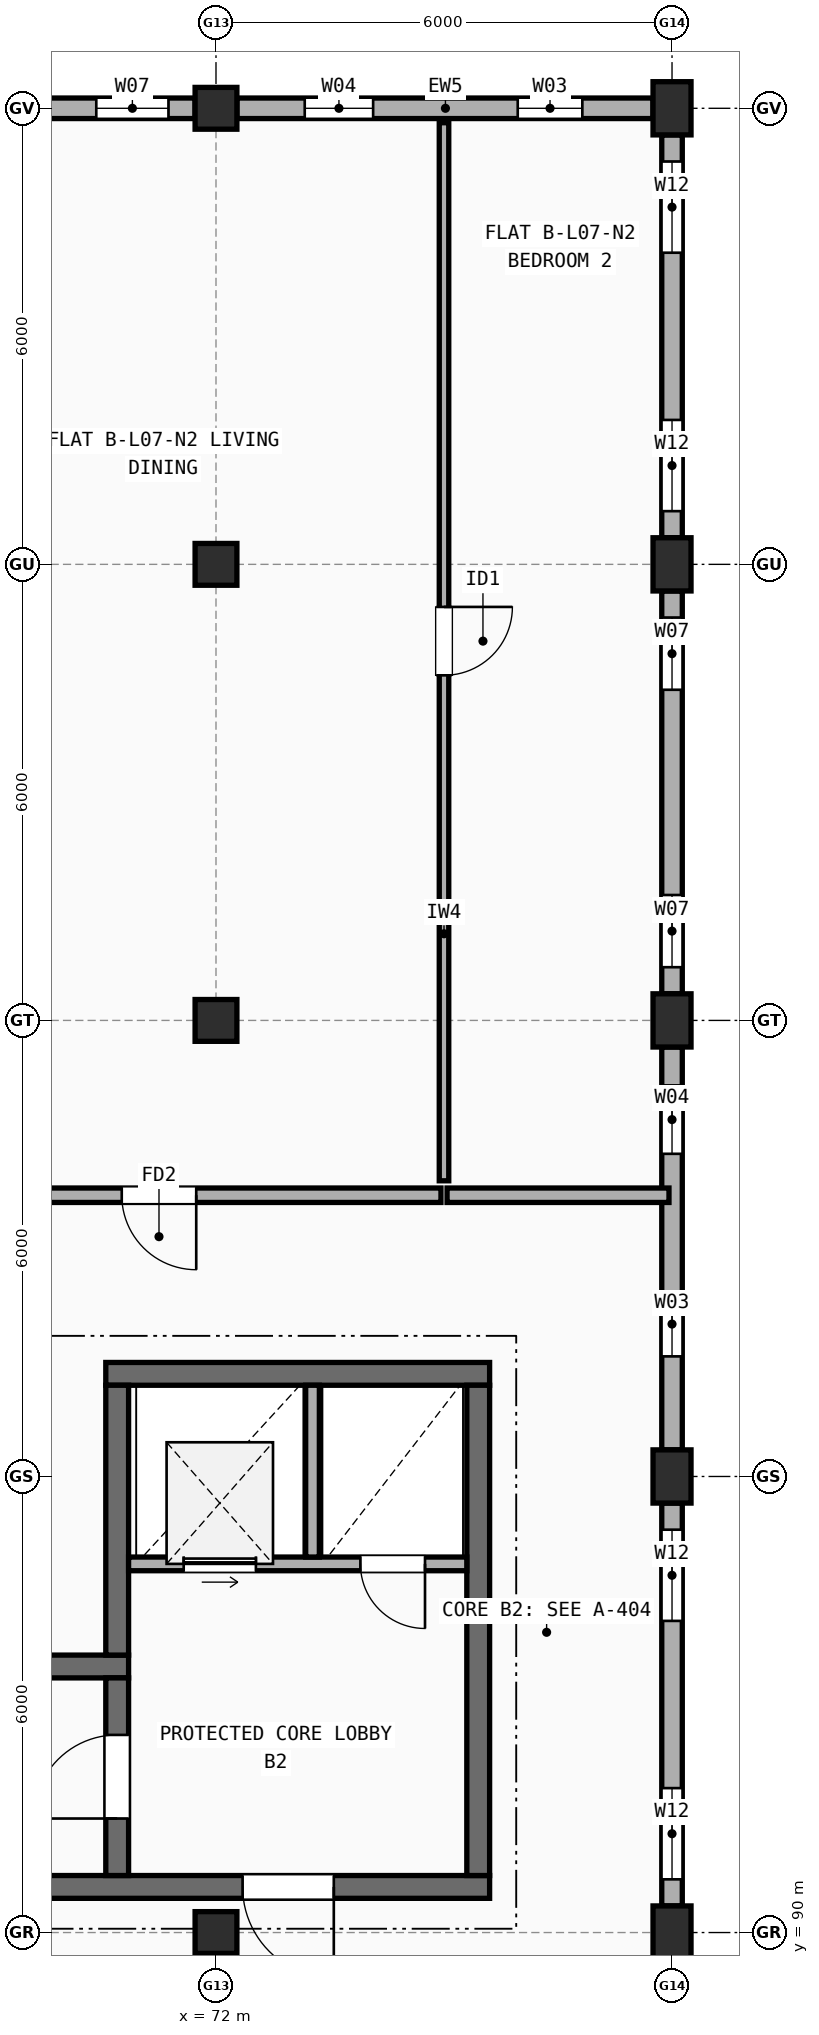
"""IFC4 building model, lengths in metres.
Left out: names, types, materials, properties, quantities, classifications, styles, units other than length and angle.
Written with IfcOpenShell. Run it as: python <this file> out.ifc"""

import sys

from ifc_helpers import new_model, si_unit, direction, frame, frame_2d, origin, origin_2d, place, context, subcontext, project, spatial, rectangle, extrude, element, fill, save


model = new_model("IFC4")
c1 = context("Model", 3, precision=1e-05, world=origin(), true_north=direction((0.0, 1.0)))
c2 = subcontext(c1, "Body", "Model", "MODEL_VIEW")
j1 = project(units=[si_unit("LENGTHUNIT", "METRE"), si_unit("PLANEANGLEUNIT", "RADIAN")], contexts=[c1])
p1 = place(None, origin())
s1 = spatial("IfcSite", under=j1, at=p1, CompositionType="ELEMENT")
p2 = place(p1, origin())
s2 = spatial("IfcBuilding", under=s1, at=p2, CompositionType="ELEMENT")
p3 = place(p2, frame((0.0, 0.0, 23.7)))
s3 = spatial("IfcBuildingStorey", under=s2, at=p3, CompositionType="ELEMENT", Elevation=23.7)
for number, where, z_axis, x_axis in (
    (1, (72.0, 90.0, 0.0), (0.0, 0.0, 1.0), (1.0, 0.0, 0.0)),
    (2, (72.0, 102.0, 0.0), (0.0, 0.0, 1.0), (1.0, 0.0, 0.0)),
    (3, (72.0, 108.0, 0.0), (0.0, 0.0, 1.0), (1.0, 0.0, 0.0)),
    (4, (72.0, 114.0, 0.0), (0.0, 0.0, 1.0), (1.0, 0.0, 0.0)),
):
    element("IfcColumn", number, at=place(p3, frame(where, z_axis=z_axis, x_axis=x_axis)), inside=s3, PredefinedType="COLUMN", context=c2, shape_type="SweptSolid", body=[
        extrude(rectangle(XDim=0.55, YDim=0.55, at=origin_2d()), origin(), (0.0, 0.0, 1.0), 2.975),
    ])
for number, where, z_axis, x_axis in (
    (5, (78.0, 90.0, 0.0), (0.0, 0.0, 1.0), (1.0, 0.0, 0.0)),
    (6, (78.0, 96.0, 0.0), (0.0, 0.0, 1.0), (1.0, 0.0, 0.0)),
    (7, (78.0, 102.0, 0.0), (0.0, 0.0, 1.0), (1.0, 0.0, 0.0)),
    (8, (78.0, 108.0, 0.0), (0.0, 0.0, 1.0), (1.0, 0.0, 0.0)),
    (9, (78.0, 114.0, 0.0), (0.0, 0.0, 1.0), (1.0, 0.0, 0.0)),
):
    element("IfcColumn", number, at=place(p3, frame(where, z_axis=z_axis, x_axis=x_axis)), inside=s3, PredefinedType="COLUMN", context=c2, shape_type="SweptSolid", body=[
        extrude(rectangle(XDim=0.5, YDim=0.7, at=origin_2d()), origin(), (0.0, 0.0, 1.0), 2.975),
    ])
p4 = place(p3, frame((78.0, 90.35, 0.0), z_axis=(0.0, 0.0, 1.0), x_axis=(0.0, 1.0, 0.0)))
e10 = element("IfcWall", 10, at=p4, inside=s3, PredefinedType="STANDARD", context=c2, shape_type="SweptSolid", body=[
    extrude(rectangle(XDim=5.3, YDim=0.27, at=frame_2d((2.65, 0.0))), origin(), (0.0, 0.0, 1.0), 2.457),
])
p5 = place(p4, frame((0.35, 0.0, 0.9)))
e11 = element("IfcOpeningElement", 11, at=p5, cuts=e10, PredefinedType="OPENING", context=c2, shape_type="SweptSolid", body=[
    extrude(rectangle(XDim=1.2, YDim=1.35, at=frame_2d((0.6, 0.675))), frame((0.0, 0.145, 0.0), z_axis=(0.0, -1.0, 0.0), x_axis=(1.0, 0.0, 0.0)), (0.0, 0.0, 1.0), 0.29),
])
p6 = place(p4, frame((3.75, 0.0, 0.9)))
e12 = element("IfcOpeningElement", 12, at=p6, cuts=e10, PredefinedType="OPENING", context=c2, shape_type="SweptSolid", body=[
    extrude(rectangle(XDim=1.2, YDim=1.35, at=frame_2d((0.6, 0.675))), frame((0.0, 0.145, 0.0), z_axis=(0.0, -1.0, 0.0), x_axis=(1.0, 0.0, 0.0)), (0.0, 0.0, 1.0), 0.29),
])
p7 = place(p3, frame((78.0, 96.35, 0.0), z_axis=(0.0, 0.0, 1.0), x_axis=(0.0, 1.0, 0.0)))
e13 = element("IfcWall", 13, at=p7, inside=s3, PredefinedType="STANDARD", context=c2, shape_type="SweptSolid", body=[
    extrude(rectangle(XDim=5.3, YDim=0.27, at=frame_2d((2.65, 0.0))), origin(), (0.0, 0.0, 1.0), 2.457),
])
p8 = place(p7, frame((1.23, 0.0, 0.9)))
e14 = element("IfcOpeningElement", 14, at=p8, cuts=e13, PredefinedType="OPENING", context=c2, shape_type="SweptSolid", body=[
    extrude(rectangle(XDim=0.85, YDim=1.25, at=frame_2d((0.425, 0.625))), frame((0.0, 0.145, 0.0), z_axis=(0.0, -1.0, 0.0), x_axis=(1.0, 0.0, 0.0)), (0.0, 0.0, 1.0), 0.29),
])
p9 = place(p7, frame((3.895, 0.0, 0.9)))
e15 = element("IfcOpeningElement", 15, at=p9, cuts=e13, PredefinedType="OPENING", context=c2, shape_type="SweptSolid", body=[
    extrude(rectangle(XDim=0.9, YDim=1.3, at=frame_2d((0.45, 0.65))), frame((0.0, 0.145, 0.0), z_axis=(0.0, -1.0, 0.0), x_axis=(1.0, 0.0, 0.0)), (0.0, 0.0, 1.0), 0.29),
])
p10 = place(p3, frame((78.0, 102.35, 0.0), z_axis=(0.0, 0.0, 1.0), x_axis=(0.0, 1.0, 0.0)))
e16 = element("IfcWall", 16, at=p10, inside=s3, PredefinedType="STANDARD", context=c2, shape_type="SweptSolid", body=[
    extrude(rectangle(XDim=5.3, YDim=0.27, at=frame_2d((2.65, 0.0))), origin(), (0.0, 0.0, 1.0), 2.457),
])
p11 = place(p10, frame((0.35, 0.0, 0.9)))
e17 = element("IfcOpeningElement", 17, at=p11, cuts=e16, PredefinedType="OPENING", context=c2, shape_type="SweptSolid", body=[
    extrude(rectangle(XDim=0.95, YDim=1.35, at=frame_2d((0.475, 0.675))), frame((0.0, 0.145, 0.0), z_axis=(0.0, -1.0, 0.0), x_axis=(1.0, 0.0, 0.0)), (0.0, 0.0, 1.0), 0.29),
])
p12 = place(p10, frame((4.0, 0.0, 0.9)))
e18 = element("IfcOpeningElement", 18, at=p12, cuts=e16, PredefinedType="OPENING", context=c2, shape_type="SweptSolid", body=[
    extrude(rectangle(XDim=0.95, YDim=1.35, at=frame_2d((0.475, 0.675))), frame((0.0, 0.145, 0.0), z_axis=(0.0, -1.0, 0.0), x_axis=(1.0, 0.0, 0.0)), (0.0, 0.0, 1.0), 0.29),
])
p13 = place(p3, frame((78.0, 108.35, 0.0), z_axis=(0.0, 0.0, 1.0), x_axis=(0.0, 1.0, 0.0)))
e19 = element("IfcWall", 19, at=p13, inside=s3, PredefinedType="STANDARD", context=c2, shape_type="SweptSolid", body=[
    extrude(rectangle(XDim=5.3, YDim=0.27, at=frame_2d((2.65, 0.0))), origin(), (0.0, 0.0, 1.0), 2.457),
])
p14 = place(p13, frame((0.35, 0.0, 0.9)))
e20 = element("IfcOpeningElement", 20, at=p14, cuts=e19, PredefinedType="OPENING", context=c2, shape_type="SweptSolid", body=[
    extrude(rectangle(XDim=1.2, YDim=1.35, at=frame_2d((0.6, 0.675))), frame((0.0, 0.145, 0.0), z_axis=(0.0, -1.0, 0.0), x_axis=(1.0, 0.0, 0.0)), (0.0, 0.0, 1.0), 0.29),
])
p15 = place(p13, frame((3.75, 0.0, 0.9)))
e21 = element("IfcOpeningElement", 21, at=p15, cuts=e19, PredefinedType="OPENING", context=c2, shape_type="SweptSolid", body=[
    extrude(rectangle(XDim=1.2, YDim=1.35, at=frame_2d((0.6, 0.675))), frame((0.0, 0.145, 0.0), z_axis=(0.0, -1.0, 0.0), x_axis=(1.0, 0.0, 0.0)), (0.0, 0.0, 1.0), 0.29),
])
p16 = place(p3, frame((77.75, 114.0, 0.0), z_axis=(0.0, 0.0, 1.0), x_axis=(-1.0, 0.0, 0.0)))
e22 = element("IfcWall", 22, at=p16, inside=s3, PredefinedType="STANDARD", context=c2, shape_type="SweptSolid", body=[
    extrude(rectangle(XDim=5.475, YDim=0.27, at=frame_2d((2.738, 0.0))), origin(), (0.0, 0.0, 1.0), 2.457),
])
p17 = place(p16, frame((0.93, 0.0, 0.9)))
e23 = element("IfcOpeningElement", 23, at=p17, cuts=e22, PredefinedType="OPENING", context=c2, shape_type="SweptSolid", body=[
    extrude(rectangle(XDim=0.85, YDim=1.25, at=frame_2d((0.425, 0.625))), frame((0.0, 0.145, 0.0), z_axis=(0.0, -1.0, 0.0), x_axis=(1.0, 0.0, 0.0)), (0.0, 0.0, 1.0), 0.29),
])
p18 = place(p16, frame((3.683, 0.0, 0.9)))
e24 = element("IfcOpeningElement", 24, at=p18, cuts=e22, PredefinedType="OPENING", context=c2, shape_type="SweptSolid", body=[
    extrude(rectangle(XDim=0.9, YDim=1.3, at=frame_2d((0.45, 0.65))), frame((0.0, 0.145, 0.0), z_axis=(0.0, -1.0, 0.0), x_axis=(1.0, 0.0, 0.0)), (0.0, 0.0, 1.0), 0.29),
])
p19 = place(p3, frame((71.725, 114.0, 0.0), z_axis=(0.0, 0.0, 1.0), x_axis=(-1.0, 0.0, 0.0)))
e25 = element("IfcWall", 25, at=p19, inside=s3, PredefinedType="STANDARD", context=c2, shape_type="SweptSolid", body=[
    extrude(rectangle(XDim=5.45, YDim=0.27, at=frame_2d((2.725, 0.0))), origin(), (0.0, 0.0, 1.0), 2.457),
])
p20 = place(p19, frame((0.35, 0.0, 0.9)))
e26 = element("IfcOpeningElement", 26, at=p20, cuts=e25, PredefinedType="OPENING", context=c2, shape_type="SweptSolid", body=[
    extrude(rectangle(XDim=0.95, YDim=1.35, at=frame_2d((0.475, 0.675))), frame((0.0, 0.145, 0.0), z_axis=(0.0, -1.0, 0.0), x_axis=(1.0, 0.0, 0.0)), (0.0, 0.0, 1.0), 0.29),
])
p21 = place(p19, frame((2.885, 0.0, 0.9)))
e27 = element("IfcOpeningElement", 27, at=p21, cuts=e25, PredefinedType="OPENING", context=c2, shape_type="SweptSolid", body=[
    extrude(rectangle(XDim=0.95, YDim=1.35, at=frame_2d((0.475, 0.675))), frame((0.0, 0.145, 0.0), z_axis=(0.0, -1.0, 0.0), x_axis=(1.0, 0.0, 0.0)), (0.0, 0.0, 1.0), 0.29),
])
p22 = place(p3, frame((64.25, 90.6, 0.0), z_axis=(0.0, 0.0, 1.0), x_axis=(1.0, 0.0, 0.0)))
e28 = element("IfcWall", 28, at=p22, inside=s3, PredefinedType="SHEAR", context=c2, shape_type="SweptSolid", body=[
    extrude(rectangle(XDim=11.35, YDim=0.3, at=frame_2d((5.675, 0.0))), origin(), (0.0, 0.0, 1.0), 2.975),
])
p23 = place(p22, frame((8.1, 0.0, 0.0)))
e29 = element("IfcOpeningElement", 29, at=p23, cuts=e28, PredefinedType="OPENING", context=c2, shape_type="SweptSolid", body=[
    extrude(rectangle(XDim=1.2, YDim=2.15, at=frame_2d((0.6, 1.075))), frame((0.0, 0.16, 0.0), z_axis=(0.0, -1.0, 0.0), x_axis=(1.0, 0.0, 0.0)), (0.0, 0.0, 1.0), 0.32),
])
p24 = place(p3, frame((70.85, 93.5, 0.0), z_axis=(0.0, 0.0, 1.0), x_axis=(-1.0, 0.0, 0.0)))
e30 = element("IfcWall", 30, at=p24, inside=s3, PredefinedType="SHEAR", context=c2, shape_type="SweptSolid", body=[
    extrude(rectangle(XDim=6.6, YDim=0.3, at=frame_2d((3.3, 0.0))), origin(), (0.0, 0.0, 1.0), 2.975),
])
p25 = place(p3, frame((70.7, 90.75, 0.0), z_axis=(0.0, 0.0, 1.0), x_axis=(0.0, 1.0, 0.0)))
e31 = element("IfcWall", 31, at=p25, inside=s3, PredefinedType="SHEAR", context=c2, shape_type="SweptSolid", body=[
    extrude(rectangle(XDim=2.6, YDim=0.3, at=frame_2d((1.3, 0.0))), origin(), (0.0, 0.0, 1.0), 2.975),
])
p26 = place(p25, frame((0.75, 0.0, 0.0)))
e32 = element("IfcOpeningElement", 32, at=p26, cuts=e31, PredefinedType="OPENING", context=c2, shape_type="SweptSolid", body=[
    extrude(rectangle(XDim=1.1, YDim=2.15, at=frame_2d((0.55, 1.075))), frame((0.0, 0.16, 0.0), z_axis=(0.0, -1.0, 0.0), x_axis=(1.0, 0.0, 0.0)), (0.0, 0.0, 1.0), 0.32),
])
p27 = place(p3, frame((75.6, 97.35, 0.0), z_axis=(0.0, 0.0, 1.0), x_axis=(-1.0, 0.0, 0.0)))
e33 = element("IfcWall", 33, at=p27, inside=s3, PredefinedType="SHEAR", context=c2, shape_type="SweptSolid", body=[
    extrude(rectangle(XDim=5.05, YDim=0.3, at=frame_2d((2.525, 0.0))), origin(), (0.0, 0.0, 1.0), 2.975),
])
p28 = place(p3, frame((75.45, 90.75, 0.0), z_axis=(0.0, 0.0, 1.0), x_axis=(0.0, 1.0, 0.0)))
e34 = element("IfcWall", 34, at=p28, inside=s3, PredefinedType="SHEAR", context=c2, shape_type="SweptSolid", body=[
    extrude(rectangle(XDim=6.45, YDim=0.3, at=frame_2d((3.225, 0.0))), origin(), (0.0, 0.0, 1.0), 2.975),
])
p29 = place(p3, frame((70.7, 93.65, 0.0), z_axis=(0.0, 0.0, 1.0), x_axis=(0.0, 1.0, 0.0)))
e35 = element("IfcWall", 35, at=p29, inside=s3, PredefinedType="SHEAR", context=c2, shape_type="SweptSolid", body=[
    extrude(rectangle(XDim=3.55, YDim=0.3, at=frame_2d((1.775, 0.0))), origin(), (0.0, 0.0, 1.0), 2.975),
])
p30 = place(p3, frame((70.85, 94.85, 0.0), z_axis=(0.0, 0.0, 1.0), x_axis=(1.0, 0.0, 0.0)))
e36 = element("IfcWall", 36, at=p30, inside=s3, PredefinedType="SOLIDWALL", context=c2, shape_type="SweptSolid", body=[
    extrude(rectangle(XDim=4.45, YDim=0.18, at=frame_2d((2.225, 0.0))), origin(), (0.0, 0.0, 1.0), 2.975),
])
p31 = place(p30, frame((0.725, 0.0, 0.0)))
e37 = element("IfcOpeningElement", 37, at=p31, cuts=e36, PredefinedType="OPENING", context=c2, shape_type="SweptSolid", body=[
    extrude(rectangle(XDim=0.95, YDim=2.15, at=frame_2d((0.475, 1.075))), frame((0.0, 0.1, 0.0), z_axis=(0.0, -1.0, 0.0), x_axis=(1.0, 0.0, 0.0)), (0.0, 0.0, 1.0), 0.2),
])
p32 = place(p30, frame((3.05, 0.0, 0.0)))
e38 = element("IfcOpeningElement", 38, at=p32, cuts=e36, PredefinedType="OPENING", context=c2, shape_type="SweptSolid", body=[
    extrude(rectangle(XDim=0.85, YDim=2.1, at=frame_2d((0.425, 1.05))), frame((0.0, 0.1, 0.0), z_axis=(0.0, -1.0, 0.0), x_axis=(1.0, 0.0, 0.0)), (0.0, 0.0, 1.0), 0.2),
])
p33 = place(p3, frame((73.27, 94.94, 0.0), z_axis=(0.0, 0.0, 1.0), x_axis=(0.0, 1.0, 0.0)))
e39 = element("IfcWall", 39, at=p33, inside=s3, PredefinedType="SOLIDWALL", context=c2, shape_type="SweptSolid", body=[
    extrude(rectangle(XDim=2.26, YDim=0.18, at=frame_2d((1.13, 0.0))), origin(), (0.0, 0.0, 1.0), 2.975),
])
p34 = place(p3, frame((67.54, 99.7, 0.0), z_axis=(0.0, 0.0, 1.0), x_axis=(1.0, 0.0, 0.0)))
e40 = element("IfcWall", 40, at=p34, inside=s3, PredefinedType="SOLIDWALL", context=c2, shape_type="SweptSolid", body=[
    extrude(rectangle(XDim=7.42, YDim=0.19, at=frame_2d((3.71, 0.0))), origin(), (0.0, 0.0, 1.0), 2.975),
])
p35 = place(p34, frame((3.22, 0.0, 0.0)))
e41 = element("IfcOpeningElement", 41, at=p35, cuts=e40, PredefinedType="OPENING", context=c2, shape_type="SweptSolid", body=[
    extrude(rectangle(XDim=0.98, YDim=2.15, at=frame_2d((0.49, 1.075))), frame((0.0, 0.105, 0.0), z_axis=(0.0, -1.0, 0.0), x_axis=(1.0, 0.0, 0.0)), (0.0, 0.0, 1.0), 0.21),
])
p36 = place(p3, frame((75.04, 99.7, 0.0), z_axis=(0.0, 0.0, 1.0), x_axis=(1.0, 0.0, 0.0)))
e42 = element("IfcWall", 42, at=p36, inside=s3, PredefinedType="SOLIDWALL", context=c2, shape_type="SweptSolid", body=[
    extrude(rectangle(XDim=2.92, YDim=0.19, at=frame_2d((1.46, 0.0))), origin(), (0.0, 0.0, 1.0), 2.457),
])
p37 = place(p3, frame((75.0, 99.89, 0.0), z_axis=(0.0, 0.0, 1.0), x_axis=(0.0, 1.0, 0.0)))
e43 = element("IfcWall", 43, at=p37, inside=s3, PredefinedType="PARTITIONING", context=c2, shape_type="SweptSolid", body=[
    extrude(rectangle(XDim=13.92, YDim=0.125, at=frame_2d((6.96, 0.0))), origin(), (0.0, 0.0, 1.0), 2.457),
])
p38 = place(p37, frame((6.65, 0.0, 0.0)))
e44 = element("IfcOpeningElement", 44, at=p38, cuts=e43, PredefinedType="OPENING", context=c2, shape_type="SweptSolid", body=[
    extrude(rectangle(XDim=0.9, YDim=2.1, at=frame_2d((0.45, 1.05))), frame((0.0, 0.073, 0.0), z_axis=(0.0, -1.0, 0.0), x_axis=(1.0, 0.0, 0.0)), (0.0, 0.0, 1.0), 0.145),
])
p39 = place(p5, origin())
e45 = element("IfcWindow", 45, at=p39, inside=s3, PartitioningType="SINGLE_PANEL", PredefinedType="WINDOW", context=c2, shape_type="SweptSolid", body=[
    extrude(rectangle(XDim=1.2, YDim=1.35, at=frame_2d((0.6, 0.675))), frame((0.0, 0.03, 0.0), z_axis=(0.0, -1.0, 0.0), x_axis=(1.0, 0.0, 0.0)), (0.0, 0.0, 1.0), 0.06),
])
fill(e11, e45)
p40 = place(p6, origin())
e46 = element("IfcWindow", 46, at=p40, inside=s3, PartitioningType="SINGLE_PANEL", PredefinedType="WINDOW", context=c2, shape_type="SweptSolid", body=[
    extrude(rectangle(XDim=1.2, YDim=1.35, at=frame_2d((0.6, 0.675))), frame((0.0, 0.03, 0.0), z_axis=(0.0, -1.0, 0.0), x_axis=(1.0, 0.0, 0.0)), (0.0, 0.0, 1.0), 0.06),
])
fill(e12, e46)
p41 = place(p8, origin())
e47 = element("IfcWindow", 47, at=p41, inside=s3, PartitioningType="SINGLE_PANEL", PredefinedType="WINDOW", context=c2, shape_type="SweptSolid", body=[
    extrude(rectangle(XDim=0.85, YDim=1.25, at=frame_2d((0.425, 0.625))), frame((0.0, 0.03, 0.0), z_axis=(0.0, -1.0, 0.0), x_axis=(1.0, 0.0, 0.0)), (0.0, 0.0, 1.0), 0.06),
])
fill(e14, e47)
p42 = place(p9, origin())
e48 = element("IfcWindow", 48, at=p42, inside=s3, PartitioningType="SINGLE_PANEL", PredefinedType="WINDOW", context=c2, shape_type="SweptSolid", body=[
    extrude(rectangle(XDim=0.9, YDim=1.3, at=frame_2d((0.45, 0.65))), frame((0.0, 0.03, 0.0), z_axis=(0.0, -1.0, 0.0), x_axis=(1.0, 0.0, 0.0)), (0.0, 0.0, 1.0), 0.06),
])
fill(e15, e48)
p43 = place(p11, origin())
e49 = element("IfcWindow", 49, at=p43, inside=s3, PartitioningType="SINGLE_PANEL", PredefinedType="WINDOW", context=c2, shape_type="SweptSolid", body=[
    extrude(rectangle(XDim=0.95, YDim=1.35, at=frame_2d((0.475, 0.675))), frame((0.0, 0.03, 0.0), z_axis=(0.0, -1.0, 0.0), x_axis=(1.0, 0.0, 0.0)), (0.0, 0.0, 1.0), 0.06),
])
fill(e17, e49)
p44 = place(p12, origin())
e50 = element("IfcWindow", 50, at=p44, inside=s3, PartitioningType="SINGLE_PANEL", PredefinedType="WINDOW", context=c2, shape_type="SweptSolid", body=[
    extrude(rectangle(XDim=0.95, YDim=1.35, at=frame_2d((0.475, 0.675))), frame((0.0, 0.03, 0.0), z_axis=(0.0, -1.0, 0.0), x_axis=(1.0, 0.0, 0.0)), (0.0, 0.0, 1.0), 0.06),
])
fill(e18, e50)
p45 = place(p14, origin())
e51 = element("IfcWindow", 51, at=p45, inside=s3, PartitioningType="SINGLE_PANEL", PredefinedType="WINDOW", context=c2, shape_type="SweptSolid", body=[
    extrude(rectangle(XDim=1.2, YDim=1.35, at=frame_2d((0.6, 0.675))), frame((0.0, 0.03, 0.0), z_axis=(0.0, -1.0, 0.0), x_axis=(1.0, 0.0, 0.0)), (0.0, 0.0, 1.0), 0.06),
])
fill(e20, e51)
p46 = place(p15, origin())
e52 = element("IfcWindow", 52, at=p46, inside=s3, PartitioningType="SINGLE_PANEL", PredefinedType="WINDOW", context=c2, shape_type="SweptSolid", body=[
    extrude(rectangle(XDim=1.2, YDim=1.35, at=frame_2d((0.6, 0.675))), frame((0.0, 0.03, 0.0), z_axis=(0.0, -1.0, 0.0), x_axis=(1.0, 0.0, 0.0)), (0.0, 0.0, 1.0), 0.06),
])
fill(e21, e52)
p47 = place(p17, origin())
e53 = element("IfcWindow", 53, at=p47, inside=s3, PartitioningType="SINGLE_PANEL", PredefinedType="WINDOW", context=c2, shape_type="SweptSolid", body=[
    extrude(rectangle(XDim=0.85, YDim=1.25, at=frame_2d((0.425, 0.625))), frame((0.0, 0.03, 0.0), z_axis=(0.0, -1.0, 0.0), x_axis=(1.0, 0.0, 0.0)), (0.0, 0.0, 1.0), 0.06),
])
fill(e23, e53)
p48 = place(p18, origin())
e54 = element("IfcWindow", 54, at=p48, inside=s3, PartitioningType="SINGLE_PANEL", PredefinedType="WINDOW", context=c2, shape_type="SweptSolid", body=[
    extrude(rectangle(XDim=0.9, YDim=1.3, at=frame_2d((0.45, 0.65))), frame((0.0, 0.03, 0.0), z_axis=(0.0, -1.0, 0.0), x_axis=(1.0, 0.0, 0.0)), (0.0, 0.0, 1.0), 0.06),
])
fill(e24, e54)
p49 = place(p20, origin())
e55 = element("IfcWindow", 55, at=p49, inside=s3, PartitioningType="SINGLE_PANEL", PredefinedType="WINDOW", context=c2, shape_type="SweptSolid", body=[
    extrude(rectangle(XDim=0.95, YDim=1.35, at=frame_2d((0.475, 0.675))), frame((0.0, 0.03, 0.0), z_axis=(0.0, -1.0, 0.0), x_axis=(1.0, 0.0, 0.0)), (0.0, 0.0, 1.0), 0.06),
])
fill(e26, e55)
p50 = place(p23, origin())
e56 = element("IfcDoor", 56, at=p50, inside=s3, OperationType="SINGLE_SWING_RIGHT", PredefinedType="DOOR", context=c2, shape_type="SweptSolid", body=[
    extrude(rectangle(XDim=1.2, YDim=2.15, at=frame_2d((0.6, 1.075))), frame((0.0, 0.025, 0.0), z_axis=(0.0, -1.0, 0.0), x_axis=(1.0, 0.0, 0.0)), (0.0, 0.0, 1.0), 0.05),
])
fill(e29, e56)
p51 = place(p26, origin())
e57 = element("IfcDoor", 57, at=p51, inside=s3, OperationType="SINGLE_SWING_LEFT", PredefinedType="DOOR", context=c2, shape_type="SweptSolid", body=[
    extrude(rectangle(XDim=1.1, YDim=2.15, at=frame_2d((0.55, 1.075))), frame((0.0, 0.025, 0.0), z_axis=(0.0, -1.0, 0.0), x_axis=(1.0, 0.0, 0.0)), (0.0, 0.0, 1.0), 0.05),
])
fill(e32, e57)
p52 = place(p31, origin())
e58 = element("IfcDoor", 58, at=p52, inside=s3, OperationType="SLIDING_TO_LEFT", PredefinedType="DOOR", context=c2, shape_type="SweptSolid", body=[
    extrude(rectangle(XDim=0.95, YDim=2.15, at=frame_2d((0.475, 1.075))), frame((0.0, 0.025, 0.0), z_axis=(0.0, -1.0, 0.0), x_axis=(1.0, 0.0, 0.0)), (0.0, 0.0, 1.0), 0.05),
])
fill(e37, e58)
p53 = place(p32, frame((0.85, 0.0, 0.0), z_axis=(0.0, 0.0, 1.0), x_axis=(-1.0, 0.0, 0.0)))
e59 = element("IfcDoor", 59, at=p53, inside=s3, OperationType="SINGLE_SWING_RIGHT", PredefinedType="DOOR", context=c2, shape_type="SweptSolid", body=[
    extrude(rectangle(XDim=0.85, YDim=2.1, at=frame_2d((0.425, 1.05))), frame((0.0, 0.025, 0.0), z_axis=(0.0, -1.0, 0.0), x_axis=(1.0, 0.0, 0.0)), (0.0, 0.0, 1.0), 0.05),
])
fill(e38, e59)
p54 = place(p35, origin())
e60 = element("IfcDoor", 60, at=p54, inside=s3, OperationType="SINGLE_SWING_RIGHT", PredefinedType="DOOR", context=c2, shape_type="SweptSolid", body=[
    extrude(rectangle(XDim=0.98, YDim=2.15, at=frame_2d((0.49, 1.075))), frame((0.0, 0.025, 0.0), z_axis=(0.0, -1.0, 0.0), x_axis=(1.0, 0.0, 0.0)), (0.0, 0.0, 1.0), 0.05),
])
fill(e41, e60)
p55 = place(p38, origin())
e61 = element("IfcDoor", 61, at=p55, inside=s3, OperationType="SINGLE_SWING_RIGHT", PredefinedType="DOOR", context=c2, shape_type="SweptSolid", body=[
    extrude(rectangle(XDim=0.9, YDim=2.1, at=frame_2d((0.45, 1.05))), frame((0.0, 0.025, 0.0), z_axis=(0.0, -1.0, 0.0), x_axis=(1.0, 0.0, 0.0)), (0.0, 0.0, 1.0), 0.05),
])
fill(e44, e61)
save(model, sys.argv[1])
